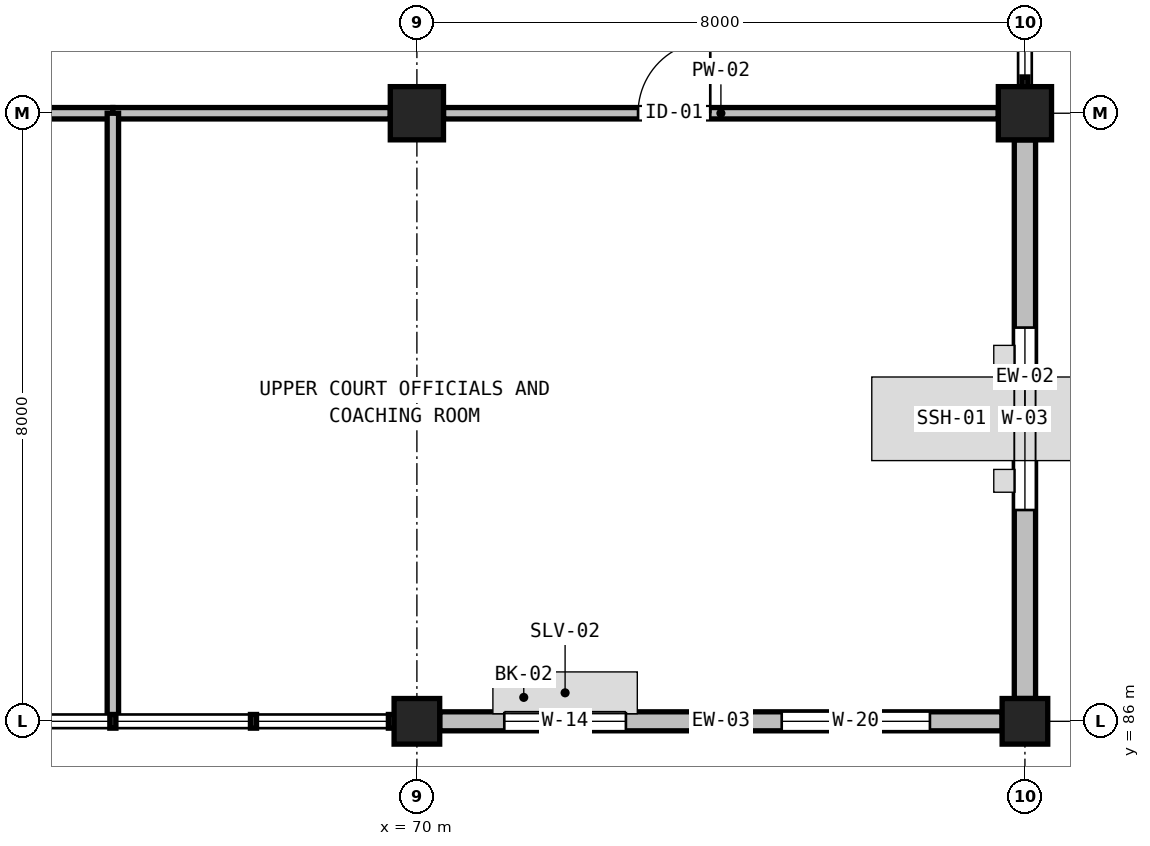
"""IFC4 building model, lengths in metres.
Left out: names, types, materials, properties, quantities, classifications, styles, units other than length and angle.
Written with IfcOpenShell. Run it as: python <this file> out.ifc"""

import sys

from ifc_helpers import new_model, si_unit, direction, frame, frame_2d, origin, origin_2d, place, context, subcontext, project, spatial, rectangle, extrude, element, fill, save


model = new_model("IFC4")
c1 = context("Model", 3, precision=1e-05, world=origin(), true_north=direction((0.0, 1.0)))
c2 = subcontext(c1, "Body", "Model", "MODEL_VIEW")
j1 = project(units=[si_unit("LENGTHUNIT", "METRE"), si_unit("PLANEANGLEUNIT", "RADIAN")], contexts=[c1])
p1 = place(None, origin())
s1 = spatial("IfcSite", under=j1, at=p1, CompositionType="ELEMENT")
p2 = place(p1, origin())
s2 = spatial("IfcBuilding", under=s1, at=p2, CompositionType="ELEMENT")
p3 = place(p2, frame((0.0, 0.0, 10.8)))
s3 = spatial("IfcBuildingStorey", under=s2, at=p3, CompositionType="ELEMENT", Elevation=10.8)
p4 = place(p3, frame((70.0, 86.0, 0.0), z_axis=(0.0, 0.0, 1.0), x_axis=(1.0, 0.0, 0.0)))
e1 = element("IfcColumn", 1, at=p4, inside=s3, PredefinedType="COLUMN", context=c2, shape_type="SweptSolid", body=[
    extrude(rectangle(XDim=0.6, YDim=0.6, at=origin_2d()), origin(), (0.0, 0.0, 1.0), 4.2),
])
p5 = place(p3, frame((70.0, 94.0, 0.0), z_axis=(0.0, 0.0, 1.0), x_axis=(1.0, 0.0, 0.0)))
e2 = element("IfcColumn", 2, at=p5, inside=s3, PredefinedType="COLUMN", context=c2, shape_type="SweptSolid", body=[
    extrude(rectangle(XDim=0.7, YDim=0.7, at=origin_2d()), origin(), (0.0, 0.0, 1.0), 4.2),
])
p6 = place(p3, frame((78.0, 86.0, 0.0), z_axis=(0.0, 0.0, 1.0), x_axis=(1.0, 0.0, 0.0)))
e3 = element("IfcColumn", 3, at=p6, inside=s3, PredefinedType="COLUMN", context=c2, shape_type="SweptSolid", body=[
    extrude(rectangle(XDim=0.6, YDim=0.6, at=origin_2d()), origin(), (0.0, 0.0, 1.0), 4.2),
])
p7 = place(p3, frame((78.0, 94.0, 0.0), z_axis=(0.0, 0.0, 1.0), x_axis=(1.0, 0.0, 0.0)))
e4 = element("IfcColumn", 4, at=p7, inside=s3, PredefinedType="COLUMN", context=c2, shape_type="SweptSolid", body=[
    extrude(rectangle(XDim=0.7, YDim=0.7, at=origin_2d()), origin(), (0.0, 0.0, 1.0), 4.2),
])
p8 = place(p3, frame((70.3, 86.0, 0.0), z_axis=(0.0, 0.0, 1.0), x_axis=(1.0, 0.0, 0.0)))
e5 = element("IfcWall", 5, at=p8, inside=s3, PredefinedType="SOLIDWALL", context=c2, shape_type="SweptSolid", body=[
    extrude(rectangle(XDim=7.4, YDim=0.25, at=frame_2d((3.7, 0.0))), origin(), (0.0, 0.0, 1.0), 3.92),
])
p9 = place(p8, frame((0.85, 0.0, 0.55)))
e6 = element("IfcOpeningElement", 6, at=p9, cuts=e5, PredefinedType="OPENING", context=c2, shape_type="SweptSolid", body=[
    extrude(rectangle(XDim=1.6, YDim=2.0, at=frame_2d((0.8, 1.0))), frame((0.0, 0.135, 0.0), z_axis=(0.0, -1.0, 0.0), x_axis=(1.0, 0.0, 0.0)), (0.0, 0.0, 1.0), 0.27),
])
p10 = place(p8, frame((4.5, 0.0, 0.7)))
e7 = element("IfcOpeningElement", 7, at=p10, cuts=e5, PredefinedType="OPENING", context=c2, shape_type="SweptSolid", body=[
    extrude(rectangle(XDim=1.95, YDim=1.85, at=frame_2d((0.975, 0.925))), frame((0.0, 0.135, 0.0), z_axis=(0.0, -1.0, 0.0), x_axis=(1.0, 0.0, 0.0)), (0.0, 0.0, 1.0), 0.27),
])
p11 = place(p3, frame((78.0, 86.3, 0.0), z_axis=(0.0, 0.0, 1.0), x_axis=(0.0, 1.0, 0.0)))
e8 = element("IfcWall", 8, at=p11, inside=s3, PredefinedType="SOLIDWALL", context=c2, shape_type="SweptSolid", body=[
    extrude(rectangle(XDim=7.35, YDim=0.28, at=frame_2d((3.675, 0.0))), origin(), (0.0, 0.0, 1.0), 3.92),
])
p12 = place(p11, frame((2.48, 0.0, 0.75)))
e9 = element("IfcOpeningElement", 9, at=p12, cuts=e8, PredefinedType="OPENING", context=c2, shape_type="SweptSolid", body=[
    extrude(rectangle(XDim=2.4, YDim=1.8, at=frame_2d((1.2, 0.9))), frame((0.0, 0.15, 0.0), z_axis=(0.0, -1.0, 0.0), x_axis=(1.0, 0.0, 0.0)), (0.0, 0.0, 1.0), 0.3),
])
p13 = place(p3, frame((62.35, 94.0, 0.0), z_axis=(0.0, 0.0, 1.0), x_axis=(1.0, 0.0, 0.0)))
e10 = element("IfcWall", 10, at=p13, inside=s3, PredefinedType="PARTITIONING", context=c2, shape_type="SweptSolid", body=[
    extrude(rectangle(XDim=3.65, YDim=0.15, at=frame_2d((1.825, 0.0))), origin(), (0.0, 0.0, 1.0), 3.26),
])
p14 = place(p13, frame((0.91, 0.0, 0.0)))
e11 = element("IfcOpeningElement", 11, at=p14, cuts=e10, PredefinedType="OPENING", context=c2, shape_type="SweptSolid", body=[
    extrude(rectangle(XDim=1.0, YDim=2.15, at=frame_2d((0.5, 1.075))), frame((0.0, 0.085, 0.0), z_axis=(0.0, -1.0, 0.0), x_axis=(1.0, 0.0, 0.0)), (0.0, 0.0, 1.0), 0.17),
])
p15 = place(p3, frame((66.0, 94.0, 0.0), z_axis=(0.0, 0.0, 1.0), x_axis=(1.0, 0.0, 0.0)))
e12 = element("IfcWall", 12, at=p15, inside=s3, PredefinedType="PARTITIONING", context=c2, shape_type="SweptSolid", body=[
    extrude(rectangle(XDim=3.65, YDim=0.15, at=frame_2d((1.825, 0.0))), origin(), (0.0, 0.0, 1.0), 3.26),
])
p16 = place(p3, frame((70.35, 94.0, 0.0), z_axis=(0.0, 0.0, 1.0), x_axis=(1.0, 0.0, 0.0)))
e13 = element("IfcWall", 13, at=p16, inside=s3, PredefinedType="PARTITIONING", context=c2, shape_type="SweptSolid", body=[
    extrude(rectangle(XDim=7.3, YDim=0.15, at=frame_2d((3.65, 0.0))), origin(), (0.0, 0.0, 1.0), 3.9),
])
p17 = place(p16, frame((2.56, 0.0, 0.0)))
e14 = element("IfcOpeningElement", 14, at=p17, cuts=e13, PredefinedType="OPENING", context=c2, shape_type="SweptSolid", body=[
    extrude(rectangle(XDim=0.95, YDim=2.1, at=frame_2d((0.475, 1.05))), frame((0.0, 0.085, 0.0), z_axis=(0.0, -1.0, 0.0), x_axis=(1.0, 0.0, 0.0)), (0.0, 0.0, 1.0), 0.17),
])
p18 = place(p3, frame((66.0, 86.0, 0.0), z_axis=(0.0, 0.0, 1.0), x_axis=(0.0, 1.0, 0.0)))
e15 = element("IfcWall", 15, at=p18, inside=s3, PredefinedType="PARTITIONING", context=c2, shape_type="SweptSolid", body=[
    extrude(rectangle(XDim=8.0, YDim=0.15, at=frame_2d((4.0, 0.0))), origin(), (0.0, 0.0, 1.0), 3.9),
])
p19 = place(p9, origin())
e16 = element("IfcWindow", 16, at=p19, inside=s3, PartitioningType="SINGLE_PANEL", PredefinedType="WINDOW", context=c2, shape_type="SweptSolid", body=[
    extrude(rectangle(XDim=1.6, YDim=2.0, at=frame_2d((0.8, 1.0))), frame((0.0, 0.03, 0.0), z_axis=(0.0, -1.0, 0.0), x_axis=(1.0, 0.0, 0.0)), (0.0, 0.0, 1.0), 0.06),
])
fill(e6, e16)
p20 = place(p10, origin())
e17 = element("IfcWindow", 17, at=p20, inside=s3, PartitioningType="SINGLE_PANEL", PredefinedType="WINDOW", context=c2, shape_type="SweptSolid", body=[
    extrude(rectangle(XDim=1.95, YDim=1.85, at=frame_2d((0.975, 0.925))), frame((0.0, 0.03, 0.0), z_axis=(0.0, -1.0, 0.0), x_axis=(1.0, 0.0, 0.0)), (0.0, 0.0, 1.0), 0.06),
])
fill(e7, e17)
p21 = place(p12, origin())
e18 = element("IfcWindow", 18, at=p21, inside=s3, PartitioningType="SINGLE_PANEL", PredefinedType="WINDOW", context=c2, shape_type="SweptSolid", body=[
    extrude(rectangle(XDim=2.4, YDim=1.8, at=frame_2d((1.2, 0.9))), frame((0.0, 0.03, 0.0), z_axis=(0.0, -1.0, 0.0), x_axis=(1.0, 0.0, 0.0)), (0.0, 0.0, 1.0), 0.06),
])
fill(e9, e18)
p22 = place(p17, origin())
e19 = element("IfcDoor", 19, at=p22, inside=s3, OperationType="SINGLE_SWING_RIGHT", PredefinedType="DOOR", context=c2, shape_type="SweptSolid", body=[
    extrude(rectangle(XDim=0.95, YDim=2.1, at=frame_2d((0.475, 1.05))), frame((0.0, 0.025, 0.0), z_axis=(0.0, -1.0, 0.0), x_axis=(1.0, 0.0, 0.0)), (0.0, 0.0, 1.0), 0.05),
])
fill(e14, e19)
save(model, sys.argv[1])
